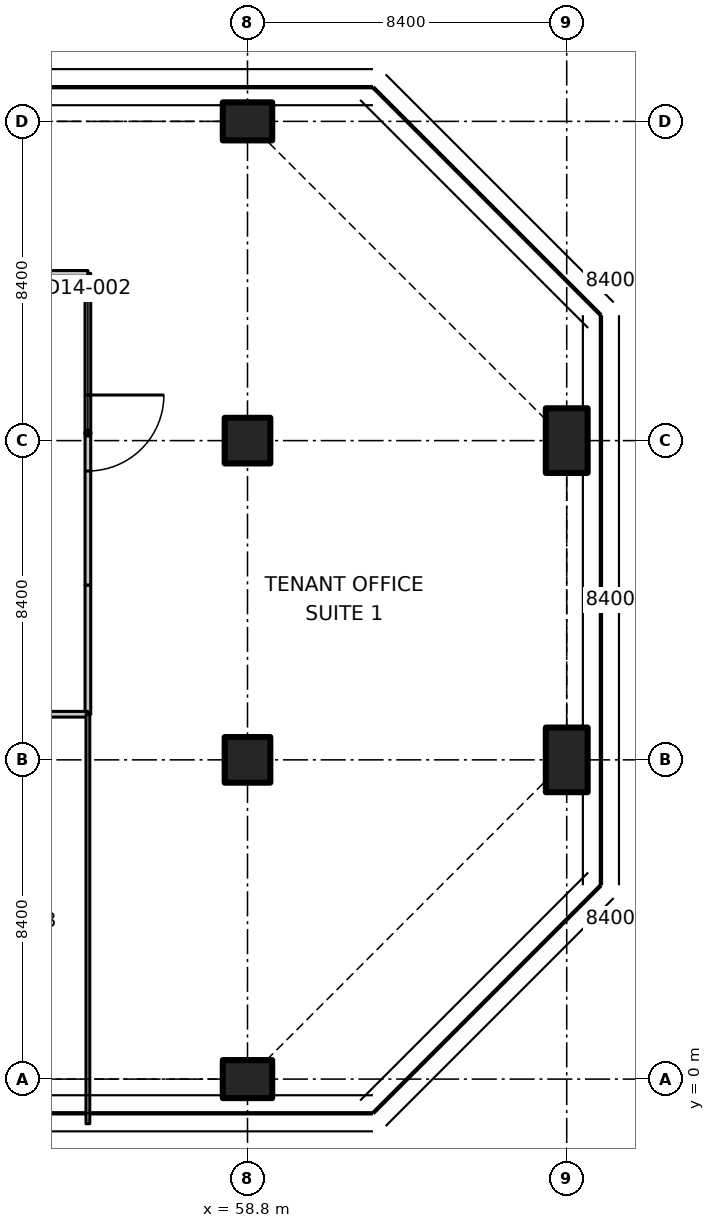
"""IFC4 building model, lengths in metres.
Left out: names, types, materials, properties, quantities, classifications, styles, units other than length and angle.
Written with IfcOpenShell. Run it as: python <this file> out.ifc"""

import sys

from ifc_helpers import new_model, si_unit, direction, frame, frame_2d, origin, origin_2d, place, context, subcontext, project, spatial, polyline, rectangle, outline, extrude, element, fill, save


model = new_model("IFC4")
c1 = context("Model", 3, precision=1e-05, world=origin(), true_north=direction((0.0, 1.0)))
c2 = subcontext(c1, "Body", "Model", "MODEL_VIEW")
j1 = project(units=[si_unit("LENGTHUNIT", "METRE"), si_unit("PLANEANGLEUNIT", "RADIAN")], contexts=[c1])
p1 = place(None, origin())
s1 = spatial("IfcSite", under=j1, at=p1, CompositionType="ELEMENT")
p2 = place(p1, origin())
s2 = spatial("IfcBuilding", under=s1, at=p2, CompositionType="ELEMENT")
p3 = place(p2, frame((0.0, 0.0, 106.1)))
s3 = spatial("IfcBuildingStorey", under=s2, at=p3, CompositionType="ELEMENT", Elevation=106.1)
p4 = place(p3, frame((58.8, 0.0, 0.0), z_axis=(0.0, 0.0, 1.0), x_axis=(0.0, 1.0, 0.0)))
e1 = element("IfcColumn", 1, at=p4, inside=s3, PredefinedType="COLUMN", context=c2, shape_type="SweptSolid", body=[
    extrude(rectangle(XDim=1.0, YDim=1.3, at=origin_2d()), origin(), (0.0, 0.0, 1.0), 3.35),
])
for number, where, z_axis, x_axis in (
    (2, (58.8, 8.4, 0.0), (0.0, 0.0, 1.0), (1.0, 0.0, 0.0)),
    (3, (58.8, 16.8, 0.0), (0.0, 0.0, 1.0), (1.0, 0.0, 0.0)),
):
    element("IfcColumn", number, at=place(p3, frame(where, z_axis=z_axis, x_axis=x_axis)), inside=s3, PredefinedType="COLUMN", context=c2, shape_type="SweptSolid", body=[
        extrude(rectangle(XDim=1.2, YDim=1.2, at=origin_2d()), origin(), (0.0, 0.0, 1.0), 3.35),
    ])
p5 = place(p3, frame((58.8, 25.2, 0.0), z_axis=(0.0, 0.0, 1.0), x_axis=(0.0, 1.0, 0.0)))
e4 = element("IfcColumn", 4, at=p5, inside=s3, PredefinedType="COLUMN", context=c2, shape_type="SweptSolid", body=[
    extrude(rectangle(XDim=1.0, YDim=1.3, at=origin_2d()), origin(), (0.0, 0.0, 1.0), 3.35),
])
for number, where, z_axis, x_axis in (
    (5, (67.2, 8.4, 0.0), (0.0, 0.0, 1.0), (1.0, 0.0, 0.0)),
    (6, (67.2, 16.8, 0.0), (0.0, 0.0, 1.0), (1.0, 0.0, 0.0)),
):
    element("IfcColumn", number, at=place(p3, frame(where, z_axis=z_axis, x_axis=x_axis)), inside=s3, PredefinedType="COLUMN", context=c2, shape_type="SweptSolid", body=[
        extrude(rectangle(XDim=1.1, YDim=1.7, at=origin_2d()), origin(), (0.0, 0.0, 1.0), 3.35),
    ])
p6 = place(p3, frame((54.6, 13.0, 0.0), z_axis=(0.0, 0.0, 1.0), x_axis=(0.0, -1.0, 0.0)))
e7 = element("IfcWall", 7, at=p6, inside=s3, PredefinedType="PARTITIONING", context=c2, shape_type="SweptSolid", body=[
    extrude(rectangle(XDim=3.4, YDim=0.15, at=frame_2d((1.7, 0.0))), origin(), (0.0, 0.0, 1.0), 3.33),
])
p7 = place(p3, frame((54.6, 9.6, 0.0), z_axis=(0.0, 0.0, 1.0), x_axis=(-1.0, 0.0, 0.0)))
e8 = element("IfcWall", 8, at=p7, inside=s3, PredefinedType="PARTITIONING", context=c2, shape_type="SweptSolid", body=[
    extrude(rectangle(XDim=4.2, YDim=0.15, at=frame_2d((2.1, 0.0))), origin(), (0.0, 0.0, 1.0), 3.33),
])
p8 = place(p7, frame((1.5, 0.0, 0.0)))
e9 = element("IfcOpeningElement", 9, at=p8, cuts=e8, PredefinedType="OPENING", context=c2, shape_type="SweptSolid", body=[
    extrude(rectangle(XDim=1.1, YDim=2.1, at=frame_2d((0.55, 1.05))), frame((0.0, 0.085, 0.0), z_axis=(0.0, -1.0, 0.0), x_axis=(1.0, 0.0, 0.0)), (0.0, 0.0, 1.0), 0.17),
])
p9 = place(p3, frame((54.6, 21.2, 0.0), z_axis=(0.0, 0.0, 1.0), x_axis=(0.0, -1.0, 0.0)))
e10 = element("IfcWall", 10, at=p9, inside=s3, PredefinedType="PARTITIONING", context=c2, shape_type="SweptSolid", body=[
    extrude(rectangle(XDim=8.2, YDim=0.15, at=frame_2d((4.1, 0.0))), origin(), (0.0, 0.0, 1.0), 3.33),
])
p10 = place(p9, frame((3.2, 0.0, 0.0)))
e11 = element("IfcOpeningElement", 11, at=p10, cuts=e10, PredefinedType="OPENING", context=c2, shape_type="SweptSolid", body=[
    extrude(rectangle(XDim=2.0, YDim=2.4, at=frame_2d((1.0, 1.2))), frame((0.0, 0.085, 0.0), z_axis=(0.0, -1.0, 0.0), x_axis=(1.0, 0.0, 0.0)), (0.0, 0.0, 1.0), 0.17),
])
p11 = place(p3, frame((54.6, -1.174, 0.0), z_axis=(0.0, 0.0, 1.0), x_axis=(0.0, 1.0, 0.0)))
e12 = element("IfcWall", 12, at=p11, inside=s3, PredefinedType="PARTITIONING", context=c2, shape_type="SweptSolid", body=[
    extrude(outline(polyline([(0.0, 0.0), (10.774, 0.0), (10.774, 3.33), (1.624, 3.33), (1.622, 2.98), (0.726, 2.98), (0.724, 3.33), (0.074, 3.33), (0.0, 3.33), (0.0, 0.0)])), frame((0.0, 0.05, 0.0), z_axis=(0.0, -1.0, 0.0), x_axis=(1.0, 0.0, 0.0)), (0.0, 0.0, 1.0), 0.1),
])
p12 = place(p3, frame((51.0, 21.2, 0.0), z_axis=(0.0, 0.0, 1.0), x_axis=(1.0, 0.0, 0.0)))
e13 = element("IfcWall", 13, at=p12, inside=s3, PredefinedType="PARTITIONING", context=c2, shape_type="SweptSolid", body=[
    extrude(rectangle(XDim=3.6, YDim=0.15, at=frame_2d((1.8, 0.0))), origin(), (0.0, 0.0, 1.0), 3.33),
])
p13 = place(p10, origin())
e14 = element("IfcDoor", 14, at=p13, inside=s3, OperationType="DOUBLE_DOOR_SINGLE_SWING", PredefinedType="DOOR", context=c2, shape_type="SweptSolid", body=[
    extrude(rectangle(XDim=2.0, YDim=2.4, at=frame_2d((1.0, 1.2))), frame((0.0, 0.025, 0.0), z_axis=(0.0, -1.0, 0.0), x_axis=(1.0, 0.0, 0.0)), (0.0, 0.0, 1.0), 0.05),
])
fill(e11, e14)
save(model, sys.argv[1])
